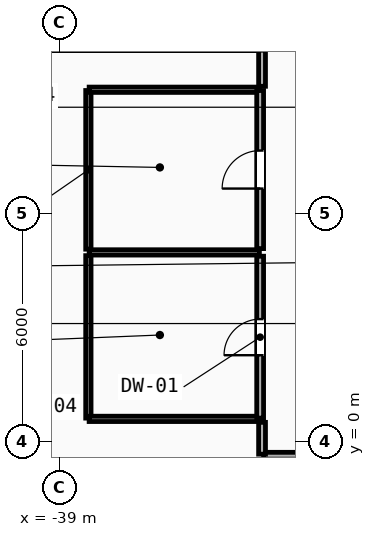
"""IFC4 building model, lengths in metres.
Left out: names, types, materials, properties, quantities, classifications, styles, units other than length and angle.
Written with IfcOpenShell. Run it as: python <this file> out.ifc"""

import sys

from ifc_helpers import new_model, si_unit, direction, frame, frame_2d, origin, place, context, subcontext, project, spatial, rectangle, extrude, element, fill, save


model = new_model("IFC4")
c1 = context("Model", 3, precision=1e-05, world=origin(), true_north=direction((0.0, 1.0)))
c2 = subcontext(c1, "Body", "Model", "MODEL_VIEW")
j1 = project(units=[si_unit("LENGTHUNIT", "METRE"), si_unit("PLANEANGLEUNIT", "RADIAN")], contexts=[c1])
p1 = place(None, origin())
s1 = spatial("IfcSite", under=j1, at=p1, CompositionType="ELEMENT")
p2 = place(p1, origin())
s2 = spatial("IfcBuilding", under=s1, at=p2, CompositionType="ELEMENT")
p3 = place(p2, frame((0.0, 0.0, 183.6)))
s3 = spatial("IfcBuildingStorey", under=s2, at=p3, CompositionType="ELEMENT", Elevation=183.6)
p4 = place(p3, frame((-38.24, 0.62, 0.0), z_axis=(0.0, 0.0, 1.0), x_axis=(0.0, 1.0, 0.0)))
e1 = element("IfcWall", 1, at=p4, inside=s3, PredefinedType="PARTITIONING", context=c2, shape_type="SweptSolid", body=[
    extrude(rectangle(XDim=4.275, YDim=0.14, at=frame_2d((2.137, 0.0))), origin(), (0.0, 0.0, 1.0), 3.32),
])
p5 = place(p3, frame((-38.24, 5.065, 0.0), z_axis=(0.0, 0.0, 1.0), x_axis=(0.0, 1.0, 0.0)))
e2 = element("IfcWall", 2, at=p5, inside=s3, PredefinedType="PARTITIONING", context=c2, shape_type="SweptSolid", body=[
    extrude(rectangle(XDim=4.175, YDim=0.14, at=frame_2d((2.087, 0.0))), origin(), (0.0, 0.0, 1.0), 3.32),
])
for number, where, z_axis, x_axis in (
    (3, (-38.22, 0.6, 0.0), (0.0, 0.0, 1.0), (1.0, 0.0, 0.0)),
    (4, (-38.22, 4.98, 0.0), (0.0, 0.0, 1.0), (1.0, 0.0, 0.0)),
    (5, (-38.22, 9.26, 0.0), (0.0, 0.0, 1.0), (1.0, 0.0, 0.0)),
):
    element("IfcWall", number, at=place(p3, frame(where, z_axis=z_axis, x_axis=x_axis)), inside=s3, PredefinedType="PARTITIONING", context=c2, shape_type="SweptSolid", body=[
        extrude(rectangle(XDim=4.48, YDim=0.14, at=frame_2d((2.24, 0.0))), origin(), (0.0, 0.0, 1.0), 3.32),
    ])
p6 = place(p3, frame((-33.72, 0.62, 0.0), z_axis=(0.0, 0.0, 1.0), x_axis=(0.0, 1.0, 0.0)))
e6 = element("IfcWall", 6, at=p6, inside=s3, PredefinedType="PARTITIONING", context=c2, shape_type="SweptSolid", body=[
    extrude(rectangle(XDim=4.26, YDim=0.18, at=frame_2d((2.13, 0.0))), origin(), (0.0, 0.0, 1.0), 3.32),
])
p7 = place(p6, frame((1.655, 0.0, 0.0)))
e7 = element("IfcOpeningElement", 7, at=p7, cuts=e6, PredefinedType="OPENING", context=c2, shape_type="SweptSolid", body=[
    extrude(rectangle(XDim=0.95, YDim=2.1, at=frame_2d((0.475, 1.05))), frame((0.0, 0.1, 0.0), z_axis=(0.0, -1.0, 0.0), x_axis=(1.0, 0.0, 0.0)), (0.0, 0.0, 1.0), 0.2),
])
p8 = place(p3, frame((-33.72, 5.08, 0.0), z_axis=(0.0, 0.0, 1.0), x_axis=(0.0, 1.0, 0.0)))
e8 = element("IfcWall", 8, at=p8, inside=s3, PredefinedType="PARTITIONING", context=c2, shape_type="SweptSolid", body=[
    extrude(rectangle(XDim=4.16, YDim=0.18, at=frame_2d((2.08, 0.0))), origin(), (0.0, 0.0, 1.0), 3.32),
])
p9 = place(p8, frame((1.58, 0.0, 0.0)))
e9 = element("IfcOpeningElement", 9, at=p9, cuts=e8, PredefinedType="OPENING", context=c2, shape_type="SweptSolid", body=[
    extrude(rectangle(XDim=1.0, YDim=2.15, at=frame_2d((0.5, 1.075))), frame((0.0, 0.1, 0.0), z_axis=(0.0, -1.0, 0.0), x_axis=(1.0, 0.0, 0.0)), (0.0, 0.0, 1.0), 0.2),
])
p10 = place(p3, frame((-33.628, -0.37, 0.0), z_axis=(0.0, 0.0, 1.0), x_axis=(1.0, 0.0, 0.0)))
e10 = element("IfcWall", 10, at=p10, inside=s3, PredefinedType="PARTITIONING", context=c2, shape_type="SweptSolid", body=[
    extrude(rectangle(XDim=5.628, YDim=0.18, at=frame_2d((2.814, 0.0))), origin(), (0.0, 0.0, 1.0), 3.32),
])
p11 = place(p3, frame((-33.67, 10.3, 0.0), z_axis=(0.0, 0.0, 1.0), x_axis=(0.0, -1.0, 0.0)))
e11 = element("IfcWall", 11, at=p11, inside=s3, PredefinedType="PARTITIONING", context=c2, shape_type="SweptSolid", body=[
    extrude(rectangle(XDim=0.949, YDim=0.18, at=frame_2d((0.474, 0.0))), origin(), (0.0, 0.0, 1.0), 3.32),
])
p12 = place(p3, frame((-33.67, 0.509, 0.0), z_axis=(0.0, 0.0, 1.0), x_axis=(0.0, -1.0, 0.0)))
e12 = element("IfcWall", 12, at=p12, inside=s3, PredefinedType="PARTITIONING", context=c2, shape_type="SweptSolid", body=[
    extrude(rectangle(XDim=0.837, YDim=0.18, at=frame_2d((0.418, 0.0))), origin(), (0.0, 0.0, 1.0), 3.32),
])
p13 = place(p7, origin())
e13 = element("IfcDoor", 13, at=p13, inside=s3, OperationType="SINGLE_SWING_LEFT", PredefinedType="DOOR", context=c2, shape_type="SweptSolid", body=[
    extrude(rectangle(XDim=0.95, YDim=2.1, at=frame_2d((0.475, 1.05))), frame((0.0, 0.025, 0.0), z_axis=(0.0, -1.0, 0.0), x_axis=(1.0, 0.0, 0.0)), (0.0, 0.0, 1.0), 0.05),
])
fill(e7, e13)
p14 = place(p9, origin())
e14 = element("IfcDoor", 14, at=p14, inside=s3, OperationType="SINGLE_SWING_LEFT", PredefinedType="DOOR", context=c2, shape_type="SweptSolid", body=[
    extrude(rectangle(XDim=1.0, YDim=2.15, at=frame_2d((0.5, 1.075))), frame((0.0, 0.025, 0.0), z_axis=(0.0, -1.0, 0.0), x_axis=(1.0, 0.0, 0.0)), (0.0, 0.0, 1.0), 0.05),
])
fill(e9, e14)
save(model, sys.argv[1])
